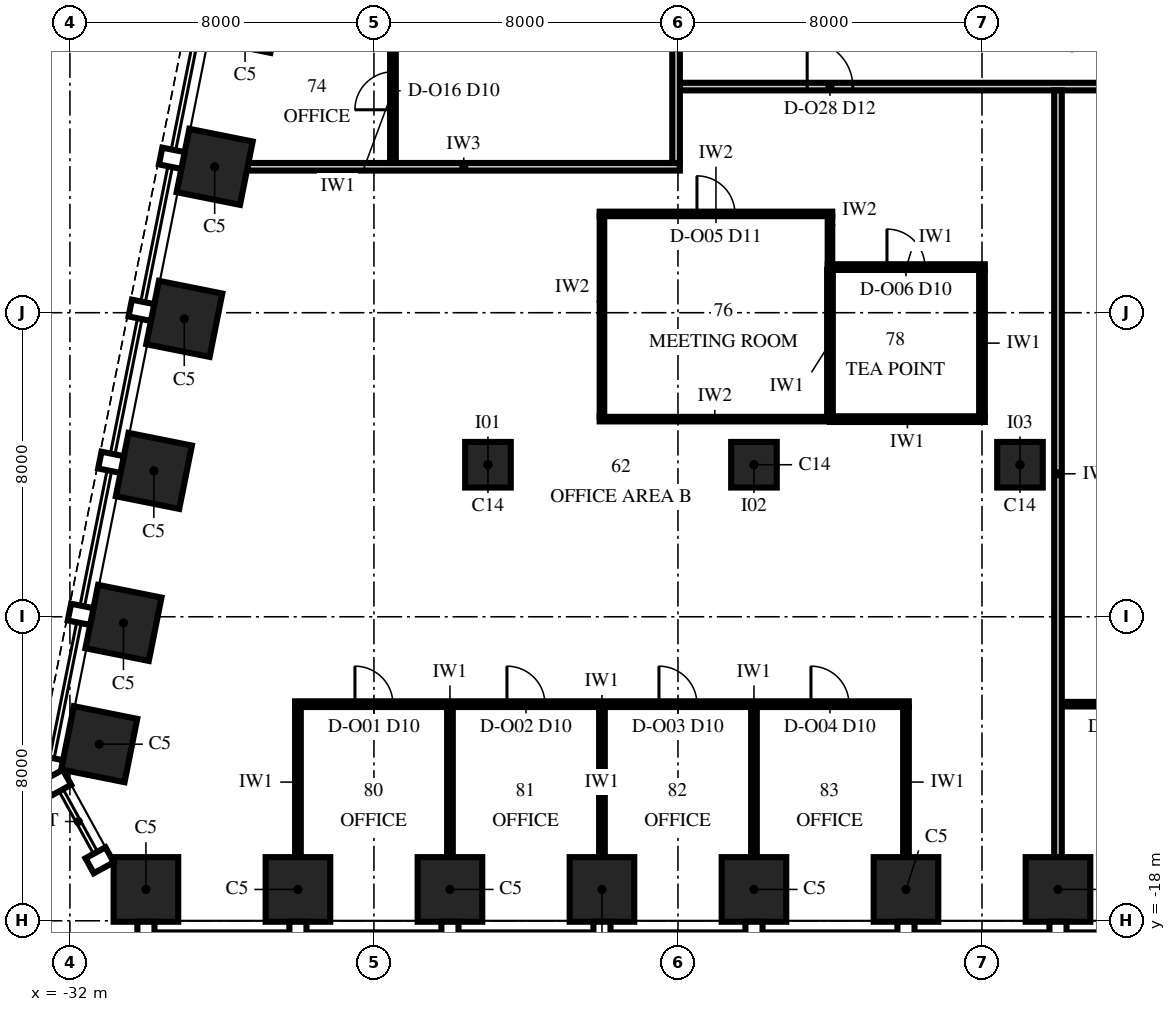
"""IFC4 building model, lengths in metres.
Left out: names, types, materials, properties, quantities, classifications, styles, units other than length and angle.
Written with IfcOpenShell. Run it as: python <this file> out.ifc"""

import sys

from ifc_helpers import new_model, si_unit, direction, frame, frame_2d, origin, origin_2d, place, context, subcontext, project, spatial, rectangle, extrude, element, fill, save


model = new_model("IFC4")
c1 = context("Model", 3, precision=1e-05, world=origin(), true_north=direction((0.0, 1.0)))
c2 = subcontext(c1, "Body", "Model", "MODEL_VIEW")
j1 = project(units=[si_unit("LENGTHUNIT", "METRE"), si_unit("PLANEANGLEUNIT", "RADIAN")], contexts=[c1])
p1 = place(None, origin())
s1 = spatial("IfcSite", under=j1, at=p1, CompositionType="ELEMENT")
p2 = place(p1, origin())
s2 = spatial("IfcBuilding", under=s1, at=p2, CompositionType="ELEMENT")
p3 = place(p2, frame((0.0, 0.0, 248.0)))
s3 = spatial("IfcBuildingStorey", under=s2, at=p3, CompositionType="ELEMENT", Elevation=248.0)
for number, where, z_axis, x_axis in (
    (1, (-30.0, -17.175, 0.0), (0.0, 0.0, 1.0), (1.0, 0.0, 0.0)),
    (2, (-26.0, -17.175, 0.0), (0.0, 0.0, 1.0), (1.0, 0.0, 0.0)),
    (3, (-22.0, -17.175, 0.0), (0.0, 0.0, 1.0), (1.0, 0.0, 0.0)),
    (4, (-18.0, -17.175, 0.0), (0.0, 0.0, 1.0), (1.0, 0.0, 0.0)),
    (5, (-14.0, -17.175, 0.0), (0.0, 0.0, 1.0), (1.0, 0.0, 0.0)),
    (6, (-10.0, -17.175, 0.0), (0.0, 0.0, 1.0), (1.0, 0.0, 0.0)),
    (7, (-6.0, -17.175, 0.0), (0.0, 0.0, 1.0), (1.0, 0.0, 0.0)),
    (8, (-27.391, 5.838, 0.0), (0.0, 0.0, 1.0), (-0.196, -0.981, 0.0)),
    (9, (-28.191, 1.838, 0.0), (0.0, 0.0, 1.0), (-0.196, -0.981, 0.0)),
    (10, (-28.991, -2.162, 0.0), (0.0, 0.0, 1.0), (-0.196, -0.981, 0.0)),
    (11, (-29.791, -6.162, 0.0), (0.0, 0.0, 1.0), (-0.196, -0.981, 0.0)),
    (12, (-30.591, -10.162, 0.0), (0.0, 0.0, 1.0), (-0.196, -0.981, 0.0)),
    (13, (-31.229, -13.353, 0.0), (0.0, 0.0, 1.0), (-0.196, -0.981, 0.0)),
):
    element("IfcColumn", number, at=place(p3, frame(where, z_axis=z_axis, x_axis=x_axis)), inside=s3, PredefinedType="COLUMN", context=c2, shape_type="SweptSolid", body=[
        extrude(rectangle(XDim=1.7, YDim=1.7, at=origin_2d()), origin(), (0.0, 0.0, 1.0), 4.0),
    ])
for number, where, z_axis, x_axis in (
    (14, (-21.0, -6.0, 0.0), (0.0, 0.0, 1.0), (1.0, 0.0, 0.0)),
    (15, (-14.0, -6.0, 0.0), (0.0, 0.0, 1.0), (1.0, 0.0, 0.0)),
    (16, (-7.0, -6.0, 0.0), (0.0, 0.0, 1.0), (1.0, 0.0, 0.0)),
):
    element("IfcColumn", number, at=place(p3, frame(where, z_axis=z_axis, x_axis=x_axis)), inside=s3, PredefinedType="COLUMN", context=c2, shape_type="SweptSolid", body=[
        extrude(rectangle(XDim=1.2, YDim=1.2, at=origin_2d()), origin(), (0.0, 0.0, 1.0), 4.0),
    ])
p4 = place(p3, frame((-26.075, -12.3, 0.0), z_axis=(0.0, 0.0, 1.0), x_axis=(1.0, 0.0, 0.0)))
e17 = element("IfcWall", 17, at=p4, inside=s3, PredefinedType="PARTITIONING", context=c2, shape_type="SweptSolid", body=[
    extrude(rectangle(XDim=16.15, YDim=0.15, at=frame_2d((8.075, 0.0))), origin(), (0.0, 0.0, 1.0), 3.23),
])
p5 = place(p4, frame((1.575, 0.0, 0.0)))
e18 = element("IfcOpeningElement", 18, at=p5, cuts=e17, PredefinedType="OPENING", context=c2, shape_type="SweptSolid", body=[
    extrude(rectangle(XDim=1.0, YDim=2.3, at=frame_2d((0.5, 1.15))), frame((0.0, 0.09, 0.0), z_axis=(0.0, -1.0, 0.0), x_axis=(1.0, 0.0, 0.0)), (0.0, 0.0, 1.0), 0.18),
])
p6 = place(p4, frame((5.575, 0.0, 0.0)))
e19 = element("IfcOpeningElement", 19, at=p6, cuts=e17, PredefinedType="OPENING", context=c2, shape_type="SweptSolid", body=[
    extrude(rectangle(XDim=1.0, YDim=2.3, at=frame_2d((0.5, 1.15))), frame((0.0, 0.09, 0.0), z_axis=(0.0, -1.0, 0.0), x_axis=(1.0, 0.0, 0.0)), (0.0, 0.0, 1.0), 0.18),
])
p7 = place(p4, frame((9.575, 0.0, 0.0)))
e20 = element("IfcOpeningElement", 20, at=p7, cuts=e17, PredefinedType="OPENING", context=c2, shape_type="SweptSolid", body=[
    extrude(rectangle(XDim=1.0, YDim=2.3, at=frame_2d((0.5, 1.15))), frame((0.0, 0.09, 0.0), z_axis=(0.0, -1.0, 0.0), x_axis=(1.0, 0.0, 0.0)), (0.0, 0.0, 1.0), 0.18),
])
p8 = place(p4, frame((13.575, 0.0, 0.0)))
e21 = element("IfcOpeningElement", 21, at=p8, cuts=e17, PredefinedType="OPENING", context=c2, shape_type="SweptSolid", body=[
    extrude(rectangle(XDim=1.0, YDim=2.3, at=frame_2d((0.5, 1.15))), frame((0.0, 0.09, 0.0), z_axis=(0.0, -1.0, 0.0), x_axis=(1.0, 0.0, 0.0)), (0.0, 0.0, 1.0), 0.18),
])
p9 = place(p3, frame((-5.9, -12.3, 0.0), z_axis=(0.0, 0.0, 1.0), x_axis=(1.0, 0.0, 0.0)))
e22 = element("IfcWall", 22, at=p9, inside=s3, PredefinedType="PARTITIONING", context=c2, shape_type="SweptSolid", body=[
    extrude(rectangle(XDim=3.9, YDim=0.12, at=frame_2d((1.95, 0.0))), origin(), (0.0, 0.0, 1.0), 3.23),
])
p10 = place(p9, frame((1.4, 0.0, 0.0)))
e23 = element("IfcOpeningElement", 23, at=p10, cuts=e22, PredefinedType="OPENING", context=c2, shape_type="SweptSolid", body=[
    extrude(rectangle(XDim=1.0, YDim=2.4, at=frame_2d((0.5, 1.2))), frame((0.0, 0.075, 0.0), z_axis=(0.0, -1.0, 0.0), x_axis=(1.0, 0.0, 0.0)), (0.0, 0.0, 1.0), 0.15),
])
p11 = place(p3, frame((-18.06, -4.8, 0.0), z_axis=(0.0, 0.0, 1.0), x_axis=(1.0, 0.0, 0.0)))
e24 = element("IfcWall", 24, at=p11, inside=s3, PredefinedType="PARTITIONING", context=c2, shape_type="SweptSolid", body=[
    extrude(rectangle(XDim=6.06, YDim=0.12, at=frame_2d((3.03, 0.0))), origin(), (0.0, 0.0, 1.0), 3.23),
])
p12 = place(p3, frame((-12.0, -4.8, 0.0), z_axis=(0.0, 0.0, 1.0), x_axis=(1.0, 0.0, 0.0)))
e25 = element("IfcWall", 25, at=p12, inside=s3, PredefinedType="PARTITIONING", context=c2, shape_type="SweptSolid", body=[
    extrude(rectangle(XDim=4.075, YDim=0.15, at=frame_2d((2.038, 0.0))), origin(), (0.0, 0.0, 1.0), 3.23),
])
p13 = place(p3, frame((-12.06, -0.8, 0.0), z_axis=(0.0, 0.0, 1.0), x_axis=(1.0, 0.0, 0.0)))
e26 = element("IfcWall", 26, at=p13, inside=s3, PredefinedType="PARTITIONING", context=c2, shape_type="SweptSolid", body=[
    extrude(rectangle(XDim=4.135, YDim=0.15, at=frame_2d((2.067, 0.0))), origin(), (0.0, 0.0, 1.0), 3.23),
])
p14 = place(p13, frame((1.56, 0.0, 0.0)))
e27 = element("IfcOpeningElement", 27, at=p14, cuts=e26, PredefinedType="OPENING", context=c2, shape_type="SweptSolid", body=[
    extrude(rectangle(XDim=1.0, YDim=2.3, at=frame_2d((0.5, 1.15))), frame((0.0, 0.09, 0.0), z_axis=(0.0, -1.0, 0.0), x_axis=(1.0, 0.0, 0.0)), (0.0, 0.0, 1.0), 0.18),
])
p15 = place(p3, frame((-18.06, 0.6, 0.0), z_axis=(0.0, 0.0, 1.0), x_axis=(1.0, 0.0, 0.0)))
e28 = element("IfcWall", 28, at=p15, inside=s3, PredefinedType="PARTITIONING", context=c2, shape_type="SweptSolid", body=[
    extrude(rectangle(XDim=6.12, YDim=0.12, at=frame_2d((3.06, 0.0))), origin(), (0.0, 0.0, 1.0), 3.23),
])
p16 = place(p15, frame((2.56, 0.0, 0.0)))
e29 = element("IfcOpeningElement", 29, at=p16, cuts=e28, PredefinedType="OPENING", context=c2, shape_type="SweptSolid", body=[
    extrude(rectangle(XDim=1.0, YDim=2.4, at=frame_2d((0.5, 1.2))), frame((0.0, 0.075, 0.0), z_axis=(0.0, -1.0, 0.0), x_axis=(1.0, 0.0, 0.0)), (0.0, 0.0, 1.0), 0.15),
])
p17 = place(p3, frame((-27.324, 1.84, 0.0), z_axis=(0.0, 0.0, 1.0), x_axis=(1.0, 0.0, 0.0)))
e30 = element("IfcWall", 30, at=p17, inside=s3, PredefinedType="PARTITIONING", context=c2, shape_type="SweptSolid", body=[
    extrude(rectangle(XDim=11.374, YDim=0.2, at=frame_2d((5.687, 0.0))), origin(), (0.0, 0.0, 1.0), 3.23),
])
p18 = place(p3, frame((-15.95, 3.95, 0.0), z_axis=(0.0, 0.0, 1.0), x_axis=(1.0, 0.0, 0.0)))
e31 = element("IfcWall", 31, at=p18, inside=s3, PredefinedType="PARTITIONING", context=c2, shape_type="SweptSolid", body=[
    extrude(rectangle(XDim=31.9, YDim=0.2, at=frame_2d((15.95, 0.0))), origin(), (0.0, 0.0, 1.0), 3.23),
])
p19 = place(p18, frame((3.35, 0.0, 0.0)))
e32 = element("IfcOpeningElement", 32, at=p19, cuts=e31, PredefinedType="OPENING", context=c2, shape_type="SweptSolid", body=[
    extrude(rectangle(XDim=1.2, YDim=2.4, at=frame_2d((0.6, 1.2))), frame((0.0, 0.115, 0.0), z_axis=(0.0, -1.0, 0.0), x_axis=(1.0, 0.0, 0.0)), (0.0, 0.0, 1.0), 0.23),
])
p20 = place(p18, frame((27.35, 0.0, 0.0)))
e33 = element("IfcOpeningElement", 33, at=p20, cuts=e31, PredefinedType="OPENING", context=c2, shape_type="SweptSolid", body=[
    extrude(rectangle(XDim=1.2, YDim=2.4, at=frame_2d((0.6, 1.2))), frame((0.0, 0.115, 0.0), z_axis=(0.0, -1.0, 0.0), x_axis=(1.0, 0.0, 0.0)), (0.0, 0.0, 1.0), 0.23),
])
p21 = place(p18, frame((15.35, 0.0, 0.0)))
e34 = element("IfcOpeningElement", 34, at=p21, cuts=e31, PredefinedType="OPENING", context=c2, shape_type="SweptSolid", body=[
    extrude(rectangle(XDim=1.2, YDim=2.4, at=frame_2d((0.6, 1.2))), frame((0.0, 0.115, 0.0), z_axis=(0.0, -1.0, 0.0), x_axis=(1.0, 0.0, 0.0)), (0.0, 0.0, 1.0), 0.23),
])
p22 = place(p3, frame((-26.0, -16.325, 0.0), z_axis=(0.0, 0.0, 1.0), x_axis=(0.0, 1.0, 0.0)))
e35 = element("IfcWall", 35, at=p22, inside=s3, PredefinedType="PARTITIONING", context=c2, shape_type="SweptSolid", body=[
    extrude(rectangle(XDim=3.95, YDim=0.15, at=frame_2d((1.975, 0.0))), origin(), (0.0, 0.0, 1.0), 3.23),
])
p23 = place(p3, frame((-23.5, 1.94, 0.0), z_axis=(0.0, 0.0, 1.0), x_axis=(0.0, 1.0, 0.0)))
e36 = element("IfcWall", 36, at=p23, inside=s3, PredefinedType="PARTITIONING", context=c2, shape_type="SweptSolid", body=[
    extrude(rectangle(XDim=3.825, YDim=0.15, at=frame_2d((1.913, 0.0))), origin(), (0.0, 0.0, 1.0), 3.85),
])
p24 = place(p23, frame((1.4, 0.0, 0.0)))
e37 = element("IfcOpeningElement", 37, at=p24, cuts=e36, PredefinedType="OPENING", context=c2, shape_type="SweptSolid", body=[
    extrude(rectangle(XDim=1.0, YDim=2.3, at=frame_2d((0.5, 1.15))), frame((0.0, 0.09, 0.0), z_axis=(0.0, -1.0, 0.0), x_axis=(1.0, 0.0, 0.0)), (0.0, 0.0, 1.0), 0.18),
])
for number, where, z_axis, x_axis in (
    (38, (-22.0, -16.325, 0.0), (0.0, 0.0, 1.0), (0.0, 1.0, 0.0)),
    (39, (-18.0, -16.325, 0.0), (0.0, 0.0, 1.0), (0.0, 1.0, 0.0)),
):
    element("IfcWall", number, at=place(p3, frame(where, z_axis=z_axis, x_axis=x_axis)), inside=s3, PredefinedType="PARTITIONING", context=c2, shape_type="SweptSolid", body=[
        extrude(rectangle(XDim=3.95, YDim=0.15, at=frame_2d((1.975, 0.0))), origin(), (0.0, 0.0, 1.0), 3.23),
    ])
p25 = place(p3, frame((-18.0, -4.74, 0.0), z_axis=(0.0, 0.0, 1.0), x_axis=(0.0, 1.0, 0.0)))
e40 = element("IfcWall", 40, at=p25, inside=s3, PredefinedType="PARTITIONING", context=c2, shape_type="SweptSolid", body=[
    extrude(rectangle(XDim=5.28, YDim=0.12, at=frame_2d((2.64, 0.0))), origin(), (0.0, 0.0, 1.0), 3.23),
])
p26 = place(p3, frame((-16.05, 1.94, 0.0), z_axis=(0.0, 0.0, 1.0), x_axis=(0.0, 1.0, 0.0)))
e41 = element("IfcWall", 41, at=p26, inside=s3, PredefinedType="PARTITIONING", context=c2, shape_type="SweptSolid", body=[
    extrude(rectangle(XDim=24.01, YDim=0.2, at=frame_2d((12.005, 0.0))), origin(), (0.0, 0.0, 1.0), 2.842),
])
p27 = place(p26, frame((8.46, 0.0, 0.0)))
e42 = element("IfcOpeningElement", 42, at=p27, cuts=e41, PredefinedType="OPENING", context=c2, shape_type="SweptSolid", body=[
    extrude(rectangle(XDim=1.2, YDim=2.4, at=frame_2d((0.6, 1.2))), frame((0.0, 0.115, 0.0), z_axis=(0.0, -1.0, 0.0), x_axis=(1.0, 0.0, 0.0)), (0.0, 0.0, 1.0), 0.23),
])
p28 = place(p3, frame((-14.0, -16.325, 0.0), z_axis=(0.0, 0.0, 1.0), x_axis=(0.0, 1.0, 0.0)))
e43 = element("IfcWall", 43, at=p28, inside=s3, PredefinedType="PARTITIONING", context=c2, shape_type="SweptSolid", body=[
    extrude(rectangle(XDim=3.95, YDim=0.15, at=frame_2d((1.975, 0.0))), origin(), (0.0, 0.0, 1.0), 3.23),
])
p29 = place(p3, frame((-12.0, -4.725, 0.0), z_axis=(0.0, 0.0, 1.0), x_axis=(0.0, 1.0, 0.0)))
e44 = element("IfcWall", 44, at=p29, inside=s3, PredefinedType="PARTITIONING", context=c2, shape_type="SweptSolid", body=[
    extrude(rectangle(XDim=3.85, YDim=0.15, at=frame_2d((1.925, 0.0))), origin(), (0.0, 0.0, 1.0), 3.85),
])
p30 = place(p3, frame((-12.0, -0.725, 0.0), z_axis=(0.0, 0.0, 1.0), x_axis=(0.0, 1.0, 0.0)))
e45 = element("IfcWall", 45, at=p30, inside=s3, PredefinedType="PARTITIONING", context=c2, shape_type="SweptSolid", body=[
    extrude(rectangle(XDim=1.265, YDim=0.12, at=frame_2d((0.633, 0.0))), origin(), (0.0, 0.0, 1.0), 3.85),
])
p31 = place(p3, frame((-10.0, -16.325, 0.0), z_axis=(0.0, 0.0, 1.0), x_axis=(0.0, 1.0, 0.0)))
e46 = element("IfcWall", 46, at=p31, inside=s3, PredefinedType="PARTITIONING", context=c2, shape_type="SweptSolid", body=[
    extrude(rectangle(XDim=3.95, YDim=0.15, at=frame_2d((1.975, 0.0))), origin(), (0.0, 0.0, 1.0), 3.23),
])
p32 = place(p3, frame((-8.0, -4.725, 0.0), z_axis=(0.0, 0.0, 1.0), x_axis=(0.0, 1.0, 0.0)))
e47 = element("IfcWall", 47, at=p32, inside=s3, PredefinedType="PARTITIONING", context=c2, shape_type="SweptSolid", body=[
    extrude(rectangle(XDim=3.85, YDim=0.15, at=frame_2d((1.925, 0.0))), origin(), (0.0, 0.0, 1.0), 3.85),
])
p33 = place(p3, frame((-6.0, -16.325, 0.0), z_axis=(0.0, 0.0, 1.0), x_axis=(0.0, 1.0, 0.0)))
e48 = element("IfcWall", 48, at=p33, inside=s3, PredefinedType="PARTITIONING", context=c2, shape_type="SweptSolid", body=[
    extrude(rectangle(XDim=20.175, YDim=0.2, at=frame_2d((10.087, 0.0))), origin(), (0.0, 0.0, 1.0), 2.842),
])
p34 = place(p5, origin())
e49 = element("IfcDoor", 49, at=p34, inside=s3, OperationType="SINGLE_SWING_LEFT", PredefinedType="DOOR", context=c2, shape_type="SweptSolid", body=[
    extrude(rectangle(XDim=1.0, YDim=2.3, at=frame_2d((0.5, 1.15))), frame((0.0, 0.075, 0.0), z_axis=(0.0, -1.0, 0.0), x_axis=(1.0, 0.0, 0.0)), (0.0, 0.0, 1.0), 0.149),
])
fill(e18, e49)
p35 = place(p6, origin())
e50 = element("IfcDoor", 50, at=p35, inside=s3, OperationType="SINGLE_SWING_LEFT", PredefinedType="DOOR", context=c2, shape_type="SweptSolid", body=[
    extrude(rectangle(XDim=1.0, YDim=2.3, at=frame_2d((0.5, 1.15))), frame((0.0, 0.075, 0.0), z_axis=(0.0, -1.0, 0.0), x_axis=(1.0, 0.0, 0.0)), (0.0, 0.0, 1.0), 0.149),
])
fill(e19, e50)
p36 = place(p7, origin())
e51 = element("IfcDoor", 51, at=p36, inside=s3, OperationType="SINGLE_SWING_LEFT", PredefinedType="DOOR", context=c2, shape_type="SweptSolid", body=[
    extrude(rectangle(XDim=1.0, YDim=2.3, at=frame_2d((0.5, 1.15))), frame((0.0, 0.075, 0.0), z_axis=(0.0, -1.0, 0.0), x_axis=(1.0, 0.0, 0.0)), (0.0, 0.0, 1.0), 0.149),
])
fill(e20, e51)
p37 = place(p8, origin())
e52 = element("IfcDoor", 52, at=p37, inside=s3, OperationType="SINGLE_SWING_LEFT", PredefinedType="DOOR", context=c2, shape_type="SweptSolid", body=[
    extrude(rectangle(XDim=1.0, YDim=2.3, at=frame_2d((0.5, 1.15))), frame((0.0, 0.075, 0.0), z_axis=(0.0, -1.0, 0.0), x_axis=(1.0, 0.0, 0.0)), (0.0, 0.0, 1.0), 0.149),
])
fill(e21, e52)
p38 = place(p16, origin())
e53 = element("IfcDoor", 53, at=p38, inside=s3, OperationType="SINGLE_SWING_RIGHT", PredefinedType="DOOR", context=c2, shape_type="SweptSolid", body=[
    extrude(rectangle(XDim=1.0, YDim=2.4, at=frame_2d((0.5, 1.2))), frame((0.0, 0.06, 0.0), z_axis=(0.0, -1.0, 0.0), x_axis=(1.0, 0.0, 0.0)), (0.0, 0.0, 1.0), 0.12),
])
fill(e29, e53)
p39 = place(p14, origin())
e54 = element("IfcDoor", 54, at=p39, inside=s3, OperationType="SINGLE_SWING_LEFT", PredefinedType="DOOR", context=c2, shape_type="SweptSolid", body=[
    extrude(rectangle(XDim=1.0, YDim=2.3, at=frame_2d((0.5, 1.15))), frame((0.0, 0.075, 0.0), z_axis=(0.0, -1.0, 0.0), x_axis=(1.0, 0.0, 0.0)), (0.0, 0.0, 1.0), 0.149),
])
fill(e27, e54)
p40 = place(p24, origin())
e55 = element("IfcDoor", 55, at=p40, inside=s3, OperationType="SINGLE_SWING_LEFT", PredefinedType="DOOR", context=c2, shape_type="SweptSolid", body=[
    extrude(rectangle(XDim=1.0, YDim=2.3, at=frame_2d((0.5, 1.15))), frame((0.0, 0.075, 0.0), z_axis=(0.0, -1.0, 0.0), x_axis=(1.0, 0.0, 0.0)), (0.0, 0.0, 1.0), 0.149),
])
fill(e37, e55)
p41 = place(p19, origin())
e56 = element("IfcDoor", 56, at=p41, inside=s3, OperationType="SINGLE_SWING_LEFT", PredefinedType="DOOR", context=c2, shape_type="SweptSolid", body=[
    extrude(rectangle(XDim=1.2, YDim=2.4, at=frame_2d((0.6, 1.2))), frame((0.0, 0.1, 0.0), z_axis=(0.0, -1.0, 0.0), x_axis=(1.0, 0.0, 0.0)), (0.0, 0.0, 1.0), 0.199),
])
fill(e32, e56)
save(model, sys.argv[1])
